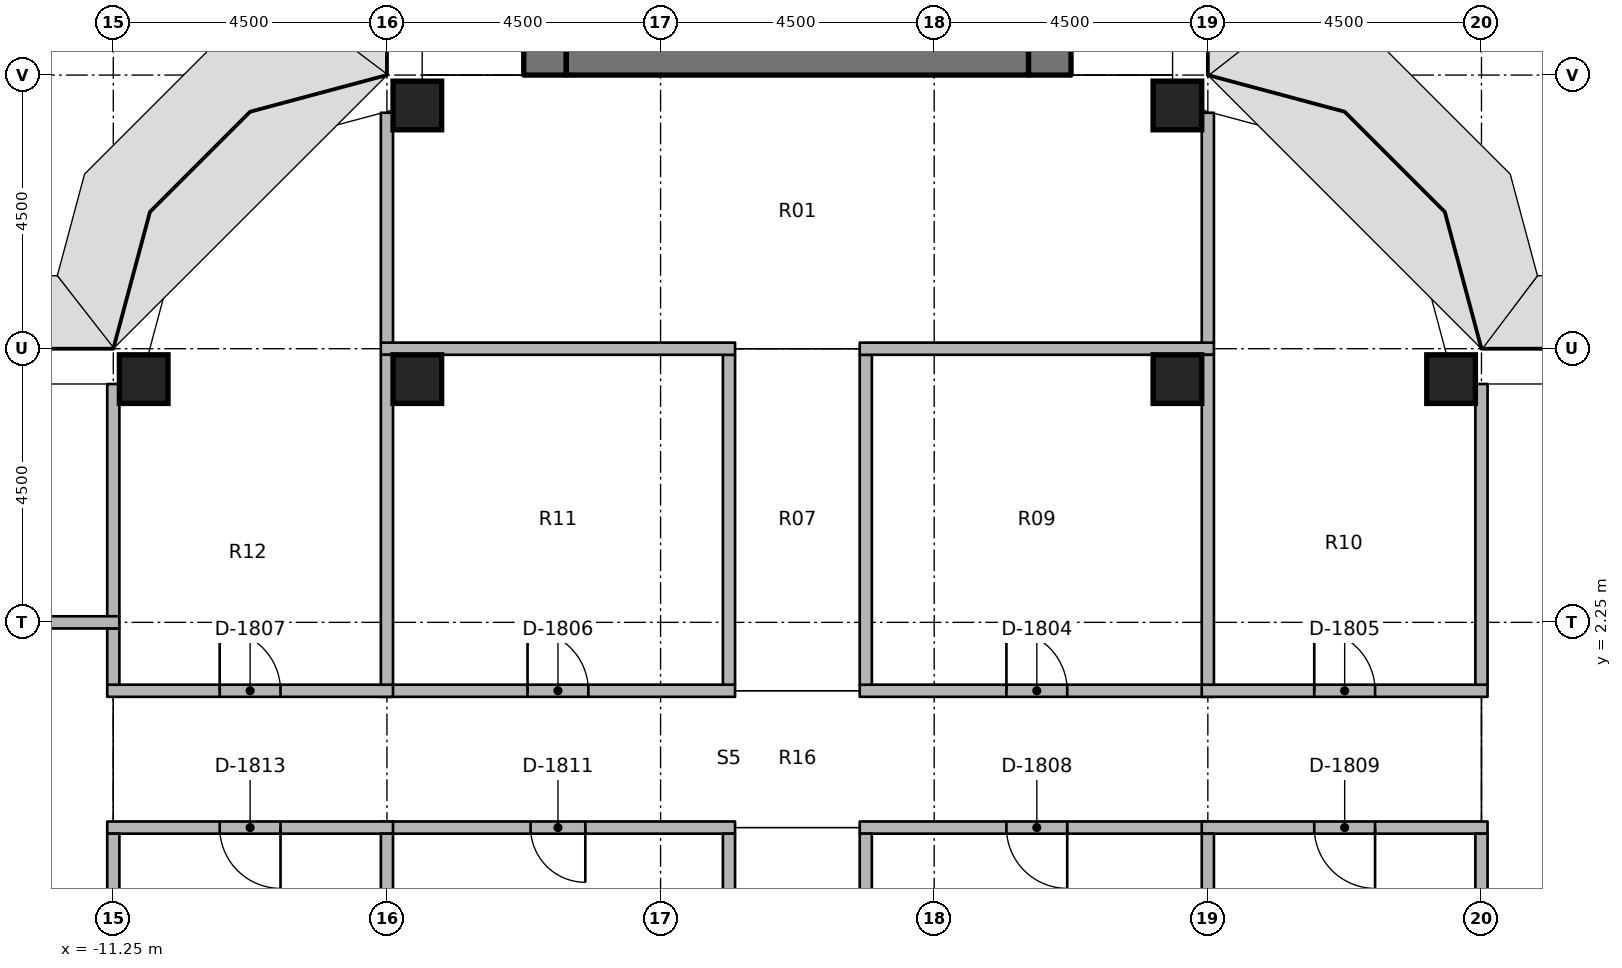
"""IFC4 building model, lengths in metres.
Left out: names, types, materials, properties, quantities, classifications, styles, units other than length and angle.
Written with IfcOpenShell. Run it as: python <this file> out.ifc"""

import sys

from ifc_helpers import new_model, si_unit, direction, frame, frame_2d, origin, origin_2d, place, context, subcontext, project, spatial, rectangle, extrude, element, fill, save


model = new_model("IFC4")
c1 = context("Model", 3, precision=1e-05, world=origin(), true_north=direction((0.0, 1.0)))
c2 = subcontext(c1, "Body", "Model", "MODEL_VIEW")
j1 = project(units=[si_unit("LENGTHUNIT", "METRE"), si_unit("PLANEANGLEUNIT", "RADIAN")], contexts=[c1])
p1 = place(None, origin())
s1 = spatial("IfcSite", under=j1, at=p1, CompositionType="ELEMENT")
p2 = place(p1, origin())
s2 = spatial("IfcBuilding", under=s1, at=p2, CompositionType="ELEMENT")
p3 = place(p2, frame((0.0, 0.0, 171.4)))
s3 = spatial("IfcBuildingStorey", under=s2, at=p3, CompositionType="ELEMENT", Elevation=171.4)
for number, where, z_axis, x_axis in (
    (1, (-10.75, 6.25, 0.0), (0.0, 0.0, 1.0), (1.0, 0.0, 0.0)),
    (2, (-6.25, 6.25, 0.0), (0.0, 0.0, 1.0), (1.0, 0.0, 0.0)),
    (3, (-6.25, 10.75, 0.0), (0.0, 0.0, 1.0), (1.0, 0.0, 0.0)),
    (4, (6.25, 6.25, 0.0), (0.0, 0.0, 1.0), (1.0, 0.0, 0.0)),
    (5, (6.25, 10.75, 0.0), (0.0, 0.0, 1.0), (1.0, 0.0, 0.0)),
    (6, (10.75, 6.25, 0.0), (0.0, 0.0, 1.0), (1.0, 0.0, 0.0)),
):
    element("IfcColumn", number, at=place(p3, frame(where, z_axis=z_axis, x_axis=x_axis)), inside=s3, PredefinedType="COLUMN", context=c2, shape_type="SweptSolid", body=[
        extrude(rectangle(XDim=0.8, YDim=0.8, at=origin_2d()), origin(), (0.0, 0.0, 1.0), 3.65),
    ])
p4 = place(p3, frame((-4.15, 11.25, 0.0), z_axis=(0.0, 0.0, 1.0), x_axis=(0.0, 1.0, 0.0)))
e7 = element("IfcWall", 7, at=p4, inside=s3, PredefinedType="SHEAR", context=c2, shape_type="SweptSolid", body=[
    extrude(rectangle(XDim=15.0, YDim=0.7, at=frame_2d((7.5, 0.0))), origin(), (0.0, 0.0, 1.0), 3.8),
])
p5 = place(p4, frame((7.15, 0.0, 0.0)))
e8 = element("IfcOpeningElement", 8, at=p5, cuts=e7, PredefinedType="OPENING", context=c2, shape_type="SweptSolid", body=[
    extrude(rectangle(XDim=1.5, YDim=2.3, at=frame_2d((0.75, 1.15))), frame((0.0, 0.36, 0.0), z_axis=(0.0, -1.0, 0.0), x_axis=(1.0, 0.0, 0.0)), (0.0, 0.0, 1.0), 0.72),
])
p6 = place(p4, frame((13.9, 0.0, 0.0)))
e9 = element("IfcOpeningElement", 9, at=p6, cuts=e7, PredefinedType="OPENING", context=c2, shape_type="SweptSolid", body=[
    extrude(rectangle(XDim=0.9, YDim=2.1, at=frame_2d((0.45, 1.05))), frame((0.0, 0.36, 0.0), z_axis=(0.0, -1.0, 0.0), x_axis=(1.0, 0.0, 0.0)), (0.0, 0.0, 1.0), 0.72),
])
p7 = place(p4, frame((1.15, 0.0, 0.0)))
e10 = element("IfcOpeningElement", 10, at=p7, cuts=e7, PredefinedType="OPENING", context=c2, shape_type="SweptSolid", body=[
    extrude(rectangle(XDim=1.2, YDim=2.1, at=frame_2d((0.6, 1.05))), frame((0.0, 0.36, 0.0), z_axis=(0.0, -1.0, 0.0), x_axis=(1.0, 0.0, 0.0)), (0.0, 0.0, 1.0), 0.72),
])
p8 = place(p3, frame((4.15, 11.25, 0.0), z_axis=(0.0, 0.0, 1.0), x_axis=(0.0, 1.0, 0.0)))
e11 = element("IfcWall", 11, at=p8, inside=s3, PredefinedType="SHEAR", context=c2, shape_type="SweptSolid", body=[
    extrude(rectangle(XDim=15.0, YDim=0.7, at=frame_2d((7.5, 0.0))), origin(), (0.0, 0.0, 1.0), 3.8),
])
p9 = place(p8, frame((7.15, 0.0, 0.0)))
e12 = element("IfcOpeningElement", 12, at=p9, cuts=e11, PredefinedType="OPENING", context=c2, shape_type="SweptSolid", body=[
    extrude(rectangle(XDim=1.5, YDim=2.3, at=frame_2d((0.75, 1.15))), frame((0.0, 0.36, 0.0), z_axis=(0.0, -1.0, 0.0), x_axis=(1.0, 0.0, 0.0)), (0.0, 0.0, 1.0), 0.72),
])
p10 = place(p8, frame((5.55, 0.0, 0.0)))
e13 = element("IfcOpeningElement", 13, at=p10, cuts=e11, PredefinedType="OPENING", context=c2, shape_type="SweptSolid", body=[
    extrude(rectangle(XDim=1.2, YDim=2.1, at=frame_2d((0.6, 1.05))), frame((0.0, 0.36, 0.0), z_axis=(0.0, -1.0, 0.0), x_axis=(1.0, 0.0, 0.0)), (0.0, 0.0, 1.0), 0.72),
])
p11 = place(p3, frame((-3.8, 11.6, 0.0), z_axis=(0.0, 0.0, 1.0), x_axis=(1.0, 0.0, 0.0)))
e14 = element("IfcWall", 14, at=p11, inside=s3, PredefinedType="SHEAR", context=c2, shape_type="SweptSolid", body=[
    extrude(rectangle(XDim=7.6, YDim=0.7, at=frame_2d((3.8, 0.0))), origin(), (0.0, 0.0, 1.0), 3.8),
])
p12 = place(p3, frame((1.025, 1.125, 0.0), z_axis=(0.0, 0.0, 1.0), x_axis=(1.0, 0.0, 0.0)))
e15 = element("IfcWall", 15, at=p12, inside=s3, PredefinedType="PARTITIONING", context=c2, shape_type="SweptSolid", body=[
    extrude(rectangle(XDim=5.825, YDim=0.2, at=frame_2d((2.913, 0.0))), origin(), (0.0, 0.0, 1.0), 2.75),
])
p13 = place(p12, frame((2.413, 0.0, 0.0)))
e16 = element("IfcOpeningElement", 16, at=p13, cuts=e15, PredefinedType="OPENING", context=c2, shape_type="SweptSolid", body=[
    extrude(rectangle(XDim=1.0, YDim=2.1, at=frame_2d((0.5, 1.05))), frame((0.0, 0.11, 0.0), z_axis=(0.0, -1.0, 0.0), x_axis=(1.0, 0.0, 0.0)), (0.0, 0.0, 1.0), 0.22),
])
p14 = place(p3, frame((6.65, 1.125, 0.0), z_axis=(0.0, 0.0, 1.0), x_axis=(1.0, 0.0, 0.0)))
e17 = element("IfcWall", 17, at=p14, inside=s3, PredefinedType="PARTITIONING", context=c2, shape_type="SweptSolid", body=[
    extrude(rectangle(XDim=4.7, YDim=0.2, at=frame_2d((2.35, 0.0))), origin(), (0.0, 0.0, 1.0), 2.75),
])
p15 = place(p14, frame((1.85, 0.0, 0.0)))
e18 = element("IfcOpeningElement", 18, at=p15, cuts=e17, PredefinedType="OPENING", context=c2, shape_type="SweptSolid", body=[
    extrude(rectangle(XDim=1.0, YDim=2.1, at=frame_2d((0.5, 1.05))), frame((0.0, 0.11, 0.0), z_axis=(0.0, -1.0, 0.0), x_axis=(1.0, 0.0, 0.0)), (0.0, 0.0, 1.0), 0.22),
])
p16 = place(p3, frame((-6.85, 1.125, 0.0), z_axis=(0.0, 0.0, 1.0), x_axis=(1.0, 0.0, 0.0)))
e19 = element("IfcWall", 19, at=p16, inside=s3, PredefinedType="PARTITIONING", context=c2, shape_type="SweptSolid", body=[
    extrude(rectangle(XDim=5.825, YDim=0.2, at=frame_2d((2.913, 0.0))), origin(), (0.0, 0.0, 1.0), 2.75),
])
p17 = place(p16, frame((2.413, 0.0, 0.0)))
e20 = element("IfcOpeningElement", 20, at=p17, cuts=e19, PredefinedType="OPENING", context=c2, shape_type="SweptSolid", body=[
    extrude(rectangle(XDim=1.0, YDim=2.1, at=frame_2d((0.5, 1.05))), frame((0.0, 0.11, 0.0), z_axis=(0.0, -1.0, 0.0), x_axis=(1.0, 0.0, 0.0)), (0.0, 0.0, 1.0), 0.22),
])
p18 = place(p3, frame((-11.35, 1.125, 0.0), z_axis=(0.0, 0.0, 1.0), x_axis=(1.0, 0.0, 0.0)))
e21 = element("IfcWall", 21, at=p18, inside=s3, PredefinedType="PARTITIONING", context=c2, shape_type="SweptSolid", body=[
    extrude(rectangle(XDim=4.7, YDim=0.2, at=frame_2d((2.35, 0.0))), origin(), (0.0, 0.0, 1.0), 2.75),
])
p19 = place(p18, frame((1.85, 0.0, 0.0)))
e22 = element("IfcOpeningElement", 22, at=p19, cuts=e21, PredefinedType="OPENING", context=c2, shape_type="SweptSolid", body=[
    extrude(rectangle(XDim=1.0, YDim=2.1, at=frame_2d((0.5, 1.05))), frame((0.0, 0.11, 0.0), z_axis=(0.0, -1.0, 0.0), x_axis=(1.0, 0.0, 0.0)), (0.0, 0.0, 1.0), 0.22),
])
p20 = place(p3, frame((6.85, -1.125, 0.0), z_axis=(0.0, 0.0, 1.0), x_axis=(-1.0, 0.0, 0.0)))
e23 = element("IfcWall", 23, at=p20, inside=s3, PredefinedType="PARTITIONING", context=c2, shape_type="SweptSolid", body=[
    extrude(rectangle(XDim=5.825, YDim=0.2, at=frame_2d((2.913, 0.0))), origin(), (0.0, 0.0, 1.0), 2.75),
])
p21 = place(p20, frame((2.413, 0.0, 0.0)))
e24 = element("IfcOpeningElement", 24, at=p21, cuts=e23, PredefinedType="OPENING", context=c2, shape_type="SweptSolid", body=[
    extrude(rectangle(XDim=1.0, YDim=2.1, at=frame_2d((0.5, 1.05))), frame((0.0, 0.11, 0.0), z_axis=(0.0, -1.0, 0.0), x_axis=(1.0, 0.0, 0.0)), (0.0, 0.0, 1.0), 0.22),
])
p22 = place(p3, frame((11.35, -1.125, 0.0), z_axis=(0.0, 0.0, 1.0), x_axis=(-1.0, 0.0, 0.0)))
e25 = element("IfcWall", 25, at=p22, inside=s3, PredefinedType="PARTITIONING", context=c2, shape_type="SweptSolid", body=[
    extrude(rectangle(XDim=4.7, YDim=0.2, at=frame_2d((2.35, 0.0))), origin(), (0.0, 0.0, 1.0), 2.75),
])
p23 = place(p22, frame((1.85, 0.0, 0.0)))
e26 = element("IfcOpeningElement", 26, at=p23, cuts=e25, PredefinedType="OPENING", context=c2, shape_type="SweptSolid", body=[
    extrude(rectangle(XDim=1.0, YDim=2.1, at=frame_2d((0.5, 1.05))), frame((0.0, 0.11, 0.0), z_axis=(0.0, -1.0, 0.0), x_axis=(1.0, 0.0, 0.0)), (0.0, 0.0, 1.0), 0.22),
])
p24 = place(p3, frame((-1.025, -1.125, 0.0), z_axis=(0.0, 0.0, 1.0), x_axis=(-1.0, 0.0, 0.0)))
e27 = element("IfcWall", 27, at=p24, inside=s3, PredefinedType="PARTITIONING", context=c2, shape_type="SweptSolid", body=[
    extrude(rectangle(XDim=5.825, YDim=0.2, at=frame_2d((2.913, 0.0))), origin(), (0.0, 0.0, 1.0), 2.75),
])
p25 = place(p24, frame((2.462, 0.0, 0.0)))
e28 = element("IfcOpeningElement", 28, at=p25, cuts=e27, PredefinedType="OPENING", context=c2, shape_type="SweptSolid", body=[
    extrude(rectangle(XDim=0.9, YDim=2.1, at=frame_2d((0.45, 1.05))), frame((0.0, 0.11, 0.0), z_axis=(0.0, -1.0, 0.0), x_axis=(1.0, 0.0, 0.0)), (0.0, 0.0, 1.0), 0.22),
])
p26 = place(p3, frame((-6.65, -1.125, 0.0), z_axis=(0.0, 0.0, 1.0), x_axis=(-1.0, 0.0, 0.0)))
e29 = element("IfcWall", 29, at=p26, inside=s3, PredefinedType="PARTITIONING", context=c2, shape_type="SweptSolid", body=[
    extrude(rectangle(XDim=4.7, YDim=0.2, at=frame_2d((2.35, 0.0))), origin(), (0.0, 0.0, 1.0), 2.75),
])
p27 = place(p26, frame((1.85, 0.0, 0.0)))
e30 = element("IfcOpeningElement", 30, at=p27, cuts=e29, PredefinedType="OPENING", context=c2, shape_type="SweptSolid", body=[
    extrude(rectangle(XDim=1.0, YDim=2.1, at=frame_2d((0.5, 1.05))), frame((0.0, 0.11, 0.0), z_axis=(0.0, -1.0, 0.0), x_axis=(1.0, 0.0, 0.0)), (0.0, 0.0, 1.0), 0.22),
])
for number, where, z_axis, x_axis in (
    (31, (1.125, 1.225, 0.0), (0.0, 0.0, 1.0), (0.0, 1.0, 0.0)),
    (32, (-1.125, 1.225, 0.0), (0.0, 0.0, 1.0), (0.0, 1.0, 0.0)),
    (33, (1.125, -6.65, 0.0), (0.0, 0.0, 1.0), (0.0, 1.0, 0.0)),
):
    element("IfcWall", number, at=place(p3, frame(where, z_axis=z_axis, x_axis=x_axis)), inside=s3, PredefinedType="PARTITIONING", context=c2, shape_type="SweptSolid", body=[
        extrude(rectangle(XDim=5.425, YDim=0.2, at=frame_2d((2.712, 0.0))), origin(), (0.0, 0.0, 1.0), 2.75),
    ])
p28 = place(p3, frame((-1.125, -3.9, 0.0), z_axis=(0.0, 0.0, 1.0), x_axis=(0.0, 1.0, 0.0)))
e34 = element("IfcWall", 34, at=p28, inside=s3, PredefinedType="PARTITIONING", context=c2, shape_type="SweptSolid", body=[
    extrude(rectangle(XDim=2.675, YDim=0.2, at=frame_2d((1.337, 0.0))), origin(), (0.0, 0.0, 1.0), 2.75),
])
p29 = place(p3, frame((1.025, 6.75, 0.0), z_axis=(0.0, 0.0, 1.0), x_axis=(1.0, 0.0, 0.0)))
e35 = element("IfcWall", 35, at=p29, inside=s3, PredefinedType="PARTITIONING", context=c2, shape_type="SweptSolid", body=[
    extrude(rectangle(XDim=5.825, YDim=0.2, at=frame_2d((2.913, 0.0))), origin(), (0.0, 0.0, 1.0), 2.75),
])
p30 = place(p3, frame((6.75, 6.85, 0.0), z_axis=(0.0, 0.0, 1.0), x_axis=(0.0, 1.0, 0.0)))
e36 = element("IfcWall", 36, at=p30, inside=s3, PredefinedType="PARTITIONING", context=c2, shape_type="SweptSolid", body=[
    extrude(rectangle(XDim=3.78, YDim=0.2, at=frame_2d((1.89, 0.0))), origin(), (0.0, 0.0, 1.0), 2.75),
])
p31 = place(p3, frame((-6.85, 6.75, 0.0), z_axis=(0.0, 0.0, 1.0), x_axis=(1.0, 0.0, 0.0)))
e37 = element("IfcWall", 37, at=p31, inside=s3, PredefinedType="PARTITIONING", context=c2, shape_type="SweptSolid", body=[
    extrude(rectangle(XDim=5.825, YDim=0.2, at=frame_2d((2.913, 0.0))), origin(), (0.0, 0.0, 1.0), 2.75),
])
p32 = place(p3, frame((-6.75, 6.85, 0.0), z_axis=(0.0, 0.0, 1.0), x_axis=(0.0, 1.0, 0.0)))
e38 = element("IfcWall", 38, at=p32, inside=s3, PredefinedType="PARTITIONING", context=c2, shape_type="SweptSolid", body=[
    extrude(rectangle(XDim=3.78, YDim=0.2, at=frame_2d((1.89, 0.0))), origin(), (0.0, 0.0, 1.0), 2.75),
])
p33 = place(p3, frame((6.75, 1.225, 0.0), z_axis=(0.0, 0.0, 1.0), x_axis=(0.0, 1.0, 0.0)))
e39 = element("IfcWall", 39, at=p33, inside=s3, PredefinedType="PARTITIONING", context=c2, shape_type="SweptSolid", body=[
    extrude(rectangle(XDim=5.425, YDim=0.2, at=frame_2d((2.712, 0.0))), origin(), (0.0, 0.0, 1.0), 2.75),
])
p34 = place(p3, frame((11.25, 1.225, 0.0), z_axis=(0.0, 0.0, 1.0), x_axis=(0.0, 1.0, 0.0)))
e40 = element("IfcWall", 40, at=p34, inside=s3, PredefinedType="PARTITIONING", context=c2, shape_type="SweptSolid", body=[
    extrude(rectangle(XDim=4.945, YDim=0.2, at=frame_2d((2.472, 0.0))), origin(), (0.0, 0.0, 1.0), 2.75),
])
p35 = place(p3, frame((-6.75, 1.225, 0.0), z_axis=(0.0, 0.0, 1.0), x_axis=(0.0, 1.0, 0.0)))
e41 = element("IfcWall", 41, at=p35, inside=s3, PredefinedType="PARTITIONING", context=c2, shape_type="SweptSolid", body=[
    extrude(rectangle(XDim=5.425, YDim=0.2, at=frame_2d((2.712, 0.0))), origin(), (0.0, 0.0, 1.0), 2.75),
])
p36 = place(p3, frame((-11.25, 1.225, 0.0), z_axis=(0.0, 0.0, 1.0), x_axis=(0.0, 1.0, 0.0)))
e42 = element("IfcWall", 42, at=p36, inside=s3, PredefinedType="PARTITIONING", context=c2, shape_type="SweptSolid", body=[
    extrude(rectangle(XDim=0.925, YDim=0.2, at=frame_2d((0.462, 0.0))), origin(), (0.0, 0.0, 1.0), 2.75),
])
p37 = place(p3, frame((-11.25, 2.35, 0.0), z_axis=(0.0, 0.0, 1.0), x_axis=(0.0, 1.0, 0.0)))
e43 = element("IfcWall", 43, at=p37, inside=s3, PredefinedType="PARTITIONING", context=c2, shape_type="SweptSolid", body=[
    extrude(rectangle(XDim=3.82, YDim=0.2, at=frame_2d((1.91, 0.0))), origin(), (0.0, 0.0, 1.0), 2.75),
])
for number, where, z_axis, x_axis in (
    (44, (6.75, -6.65, 0.0), (0.0, 0.0, 1.0), (0.0, 1.0, 0.0)),
    (45, (11.25, -6.65, 0.0), (0.0, 0.0, 1.0), (0.0, 1.0, 0.0)),
):
    element("IfcWall", number, at=place(p3, frame(where, z_axis=z_axis, x_axis=x_axis)), inside=s3, PredefinedType="PARTITIONING", context=c2, shape_type="SweptSolid", body=[
        extrude(rectangle(XDim=5.425, YDim=0.2, at=frame_2d((2.712, 0.0))), origin(), (0.0, 0.0, 1.0), 2.75),
    ])
p38 = place(p3, frame((-6.75, -3.9, 0.0), z_axis=(0.0, 0.0, 1.0), x_axis=(0.0, 1.0, 0.0)))
e46 = element("IfcWall", 46, at=p38, inside=s3, PredefinedType="PARTITIONING", context=c2, shape_type="SweptSolid", body=[
    extrude(rectangle(XDim=2.675, YDim=0.2, at=frame_2d((1.337, 0.0))), origin(), (0.0, 0.0, 1.0), 2.75),
])
p39 = place(p3, frame((-11.25, -2.15, 0.0), z_axis=(0.0, 0.0, 1.0), x_axis=(0.0, 1.0, 0.0)))
e47 = element("IfcWall", 47, at=p39, inside=s3, PredefinedType="PARTITIONING", context=c2, shape_type="SweptSolid", body=[
    extrude(rectangle(XDim=0.925, YDim=0.2, at=frame_2d((0.462, 0.0))), origin(), (0.0, 0.0, 1.0), 2.75),
])
p40 = place(p3, frame((-15.85, 2.25, 0.0), z_axis=(0.0, 0.0, 1.0), x_axis=(1.0, 0.0, 0.0)))
e48 = element("IfcWall", 48, at=p40, inside=s3, PredefinedType="PARTITIONING", context=c2, shape_type="SweptSolid", body=[
    extrude(rectangle(XDim=4.7, YDim=0.2, at=frame_2d((2.35, 0.0))), origin(), (0.0, 0.0, 1.0), 2.75),
])
p41 = place(p40, frame((1.85, 0.0, 0.0)))
e49 = element("IfcOpeningElement", 49, at=p41, cuts=e48, PredefinedType="OPENING", context=c2, shape_type="SweptSolid", body=[
    extrude(rectangle(XDim=1.0, YDim=2.1, at=frame_2d((0.5, 1.05))), frame((0.0, 0.11, 0.0), z_axis=(0.0, -1.0, 0.0), x_axis=(1.0, 0.0, 0.0)), (0.0, 0.0, 1.0), 0.22),
])
p42 = place(p13, origin())
e50 = element("IfcDoor", 50, at=p42, inside=s3, OperationType="SINGLE_SWING_RIGHT", PredefinedType="DOOR", context=c2, shape_type="SweptSolid", body=[
    extrude(rectangle(XDim=1.0, YDim=2.1, at=frame_2d((0.5, 1.05))), frame((0.0, 0.025, 0.0), z_axis=(0.0, -1.0, 0.0), x_axis=(1.0, 0.0, 0.0)), (0.0, 0.0, 1.0), 0.05),
])
fill(e16, e50)
p43 = place(p15, origin())
e51 = element("IfcDoor", 51, at=p43, inside=s3, OperationType="SINGLE_SWING_RIGHT", PredefinedType="DOOR", context=c2, shape_type="SweptSolid", body=[
    extrude(rectangle(XDim=1.0, YDim=2.1, at=frame_2d((0.5, 1.05))), frame((0.0, 0.025, 0.0), z_axis=(0.0, -1.0, 0.0), x_axis=(1.0, 0.0, 0.0)), (0.0, 0.0, 1.0), 0.05),
])
fill(e18, e51)
p44 = place(p17, origin())
e52 = element("IfcDoor", 52, at=p44, inside=s3, OperationType="SINGLE_SWING_RIGHT", PredefinedType="DOOR", context=c2, shape_type="SweptSolid", body=[
    extrude(rectangle(XDim=1.0, YDim=2.1, at=frame_2d((0.5, 1.05))), frame((0.0, 0.025, 0.0), z_axis=(0.0, -1.0, 0.0), x_axis=(1.0, 0.0, 0.0)), (0.0, 0.0, 1.0), 0.05),
])
fill(e20, e52)
p45 = place(p19, origin())
e53 = element("IfcDoor", 53, at=p45, inside=s3, OperationType="SINGLE_SWING_RIGHT", PredefinedType="DOOR", context=c2, shape_type="SweptSolid", body=[
    extrude(rectangle(XDim=1.0, YDim=2.1, at=frame_2d((0.5, 1.05))), frame((0.0, 0.025, 0.0), z_axis=(0.0, -1.0, 0.0), x_axis=(1.0, 0.0, 0.0)), (0.0, 0.0, 1.0), 0.05),
])
fill(e22, e53)
p46 = place(p21, origin())
e54 = element("IfcDoor", 54, at=p46, inside=s3, OperationType="SINGLE_SWING_RIGHT", PredefinedType="DOOR", context=c2, shape_type="SweptSolid", body=[
    extrude(rectangle(XDim=1.0, YDim=2.1, at=frame_2d((0.5, 1.05))), frame((0.0, 0.025, 0.0), z_axis=(0.0, -1.0, 0.0), x_axis=(1.0, 0.0, 0.0)), (0.0, 0.0, 1.0), 0.05),
])
fill(e24, e54)
p47 = place(p23, origin())
e55 = element("IfcDoor", 55, at=p47, inside=s3, OperationType="SINGLE_SWING_RIGHT", PredefinedType="DOOR", context=c2, shape_type="SweptSolid", body=[
    extrude(rectangle(XDim=1.0, YDim=2.1, at=frame_2d((0.5, 1.05))), frame((0.0, 0.025, 0.0), z_axis=(0.0, -1.0, 0.0), x_axis=(1.0, 0.0, 0.0)), (0.0, 0.0, 1.0), 0.05),
])
fill(e26, e55)
p48 = place(p25, origin())
e56 = element("IfcDoor", 56, at=p48, inside=s3, OperationType="SINGLE_SWING_RIGHT", PredefinedType="DOOR", context=c2, shape_type="SweptSolid", body=[
    extrude(rectangle(XDim=0.9, YDim=2.1, at=frame_2d((0.45, 1.05))), frame((0.0, 0.025, 0.0), z_axis=(0.0, -1.0, 0.0), x_axis=(1.0, 0.0, 0.0)), (0.0, 0.0, 1.0), 0.05),
])
fill(e28, e56)
p49 = place(p27, origin())
e57 = element("IfcDoor", 57, at=p49, inside=s3, OperationType="SINGLE_SWING_RIGHT", PredefinedType="DOOR", context=c2, shape_type="SweptSolid", body=[
    extrude(rectangle(XDim=1.0, YDim=2.1, at=frame_2d((0.5, 1.05))), frame((0.0, 0.025, 0.0), z_axis=(0.0, -1.0, 0.0), x_axis=(1.0, 0.0, 0.0)), (0.0, 0.0, 1.0), 0.05),
])
fill(e30, e57)
save(model, sys.argv[1])
